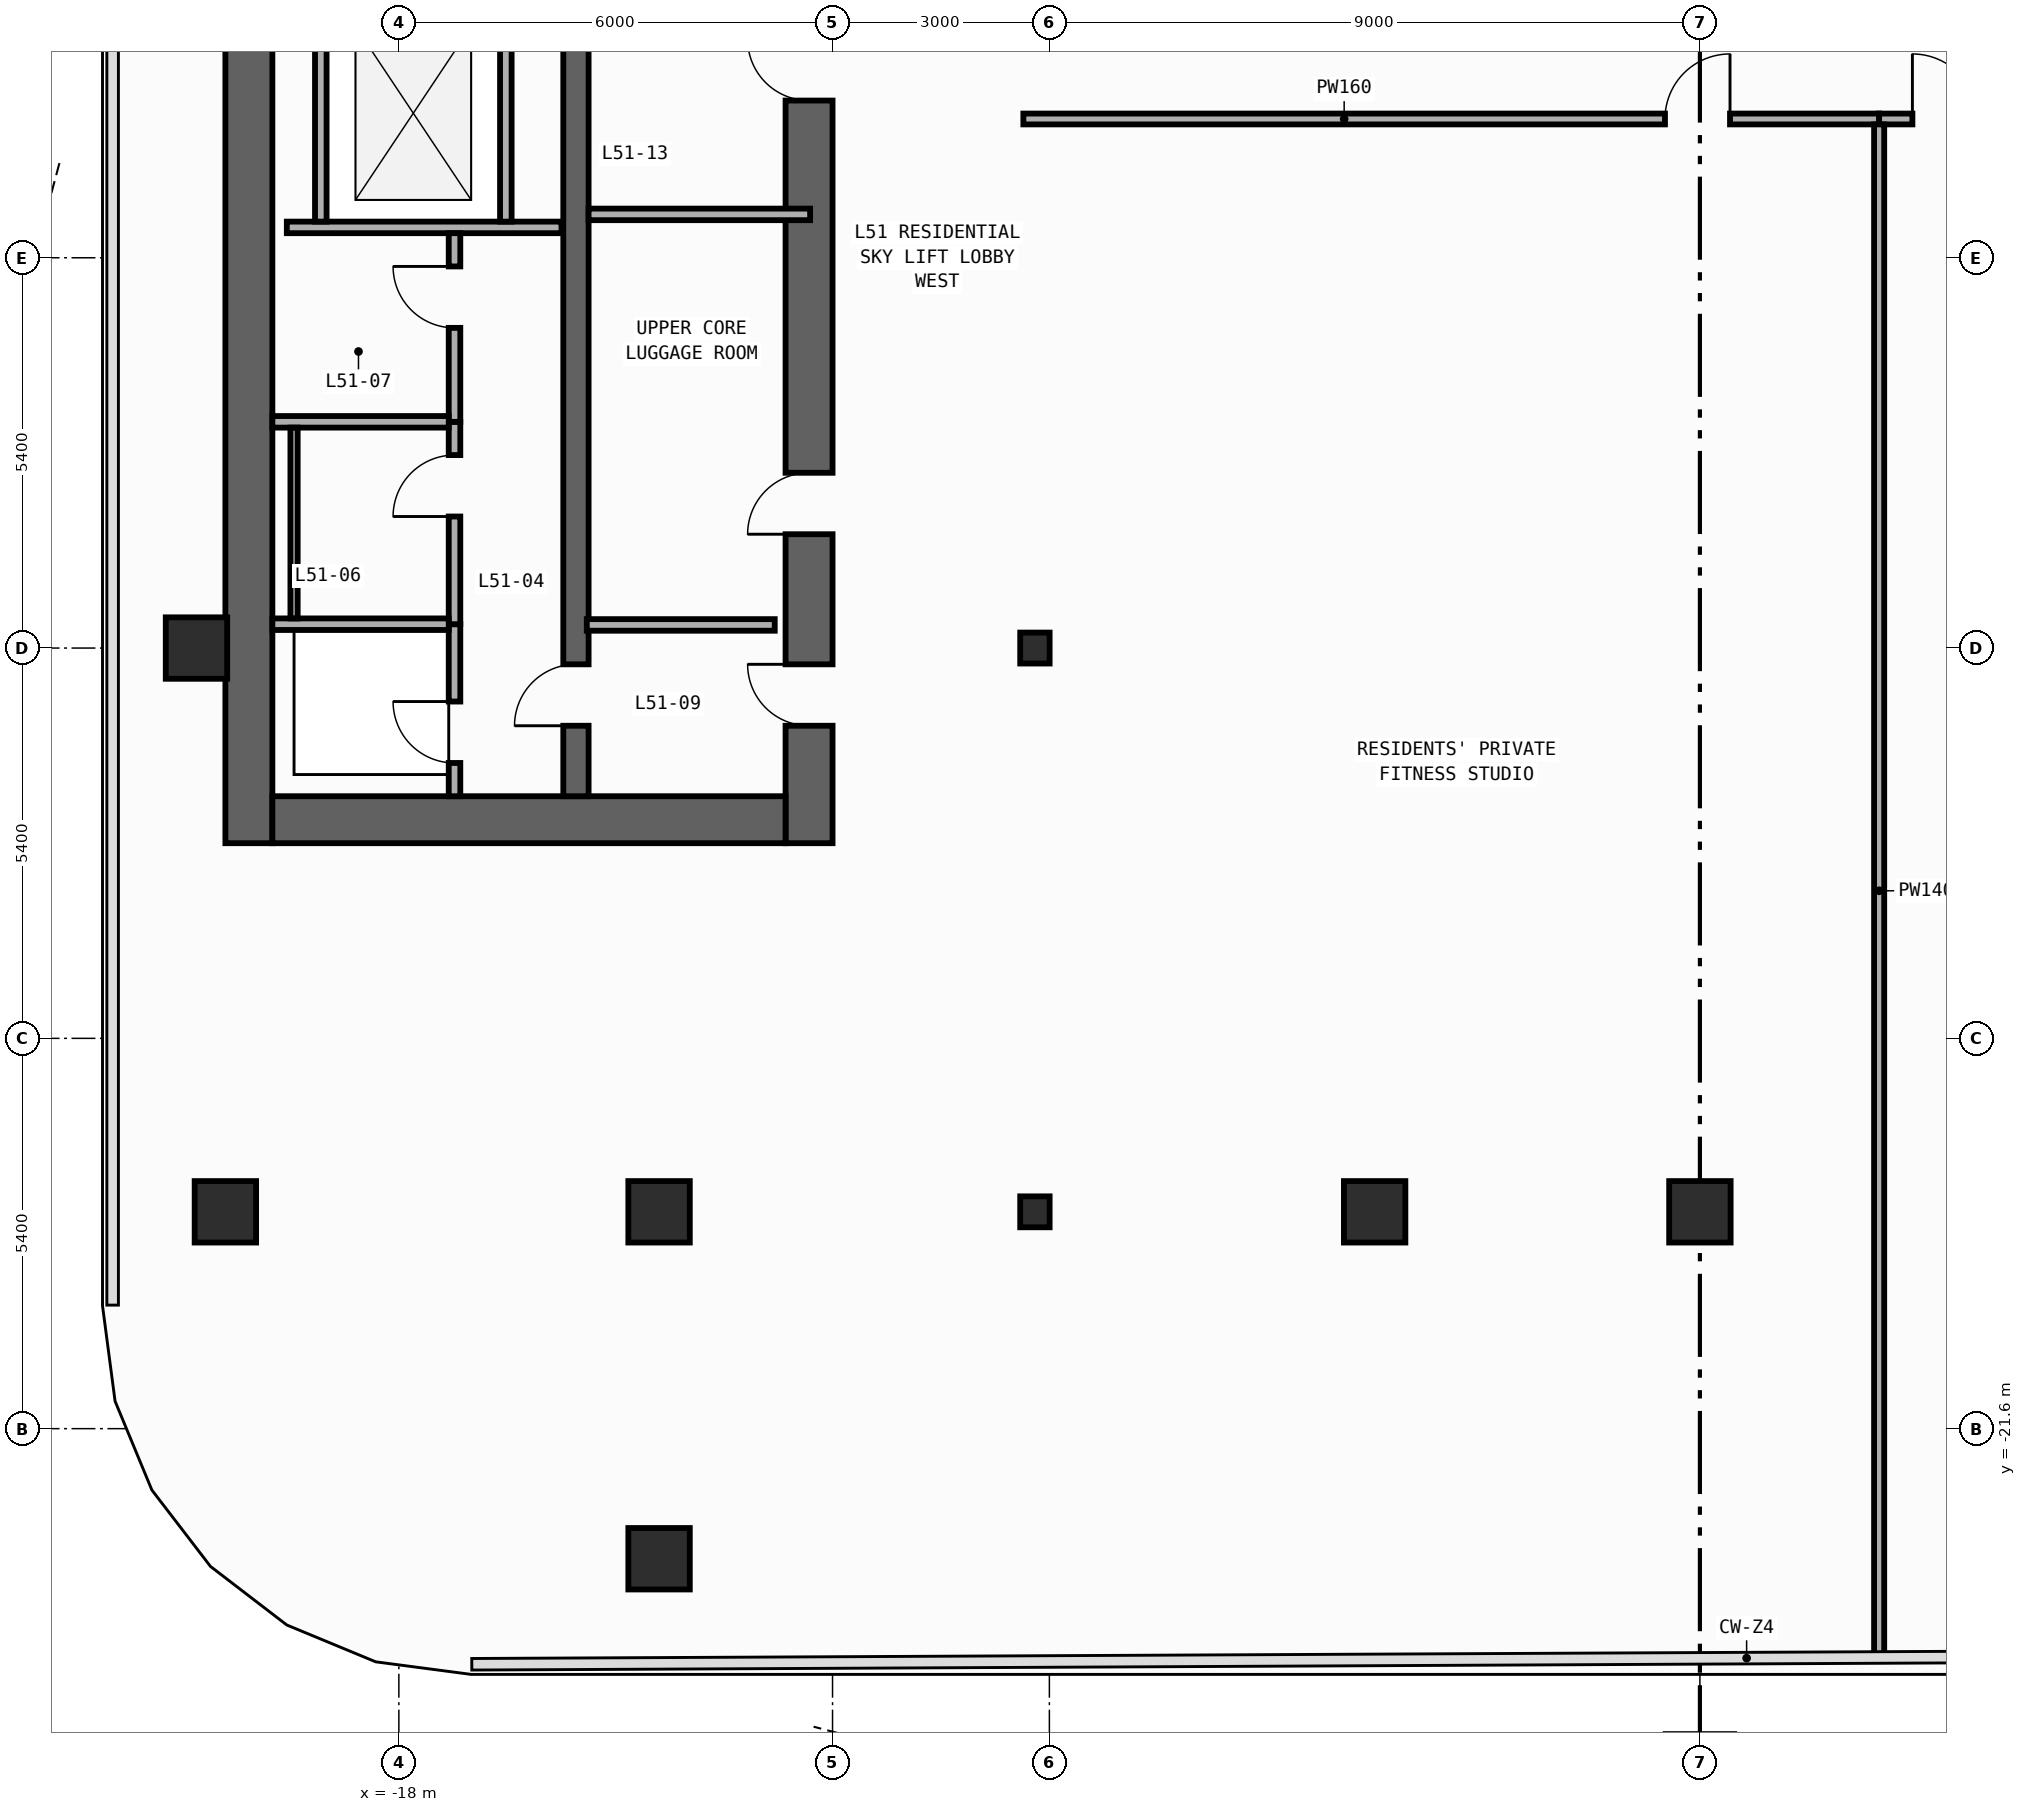
"""IFC4 building model, lengths in metres.
Left out: names, types, materials, properties, quantities, classifications, styles, units other than length and angle.
Written with IfcOpenShell. Run it as: python <this file> out.ifc"""

import sys

from ifc_helpers import new_model, si_unit, direction, frame, frame_2d, origin, origin_2d, place, context, subcontext, project, spatial, rectangle, i_section, extrude, element, fill, save


model = new_model("IFC4")
c1 = context("Model", 3, precision=1e-05, world=origin(), true_north=direction((0.0, 1.0)))
c2 = subcontext(c1, "Body", "Model", "MODEL_VIEW")
j1 = project(units=[si_unit("LENGTHUNIT", "METRE"), si_unit("PLANEANGLEUNIT", "RADIAN")], contexts=[c1])
p1 = place(None, origin())
s1 = spatial("IfcSite", under=j1, at=p1, CompositionType="ELEMENT")
p2 = place(p1, origin())
s2 = spatial("IfcBuilding", under=s1, at=p2, CompositionType="ELEMENT")
p3 = place(p2, frame((0.0, 0.0, 222.4)))
s3 = spatial("IfcBuildingStorey", under=s2, at=p3, CompositionType="ELEMENT", Elevation=222.4)
p4 = place(p3, frame((-20.075, -13.5, 0.0), z_axis=(0.0, 0.0, 1.0), x_axis=(0.0, 1.0, 0.0)))
e1 = element("IfcWall", 1, at=p4, inside=s3, PredefinedType="SHEAR", context=c2, shape_type="SweptSolid", body=[
    extrude(rectangle(XDim=27.0, YDim=0.65, at=frame_2d((13.5, 0.0))), origin(), (0.0, 0.0, 1.0), 3.34),
])
p5 = place(p3, frame((-12.325, -13.5, 0.0), z_axis=(0.0, 0.0, 1.0), x_axis=(0.0, 1.0, 0.0)))
e2 = element("IfcWall", 2, at=p5, inside=s3, PredefinedType="SHEAR", context=c2, shape_type="SweptSolid", body=[
    extrude(rectangle(XDim=27.0, YDim=0.65, at=frame_2d((13.5, 0.0))), origin(), (0.0, 0.0, 1.0), 3.34),
])
p6 = place(p5, frame((15.175, 0.0, 0.0)))
e3 = element("IfcOpeningElement", 3, at=p6, cuts=e2, PredefinedType="OPENING", context=c2, shape_type="SweptSolid", body=[
    extrude(rectangle(XDim=0.85, YDim=2.1, at=frame_2d((0.425, 1.05))), frame((0.0, 0.335, 0.0), z_axis=(0.0, -1.0, 0.0), x_axis=(1.0, 0.0, 0.0)), (0.0, 0.0, 1.0), 0.67),
])
p7 = place(p5, frame((21.275, 0.0, 0.0)))
e4 = element("IfcOpeningElement", 4, at=p7, cuts=e2, PredefinedType="OPENING", context=c2, shape_type="SweptSolid", body=[
    extrude(rectangle(XDim=0.85, YDim=2.1, at=frame_2d((0.425, 1.05))), frame((0.0, 0.335, 0.0), z_axis=(0.0, -1.0, 0.0), x_axis=(1.0, 0.0, 0.0)), (0.0, 0.0, 1.0), 0.67),
])
p8 = place(p5, frame((4.275, 0.0, 0.0)))
e5 = element("IfcOpeningElement", 5, at=p8, cuts=e2, PredefinedType="OPENING", context=c2, shape_type="SweptSolid", body=[
    extrude(rectangle(XDim=0.85, YDim=2.1, at=frame_2d((0.425, 1.05))), frame((0.0, 0.335, 0.0), z_axis=(0.0, -1.0, 0.0), x_axis=(1.0, 0.0, 0.0)), (0.0, 0.0, 1.0), 0.67),
])
p9 = place(p5, frame((10.275, 0.0, 0.0)))
e6 = element("IfcOpeningElement", 6, at=p9, cuts=e2, PredefinedType="OPENING", context=c2, shape_type="SweptSolid", body=[
    extrude(rectangle(XDim=0.85, YDim=2.1, at=frame_2d((0.425, 1.05))), frame((0.0, 0.335, 0.0), z_axis=(0.0, -1.0, 0.0), x_axis=(1.0, 0.0, 0.0)), (0.0, 0.0, 1.0), 0.67),
])
p10 = place(p5, frame((12.725, 0.0, 0.0)))
e7 = element("IfcOpeningElement", 7, at=p10, cuts=e2, PredefinedType="OPENING", context=c2, shape_type="SweptSolid", body=[
    extrude(rectangle(XDim=1.15, YDim=2.2, at=frame_2d((0.575, 1.1))), frame((0.0, 0.335, 0.0), z_axis=(0.0, -1.0, 0.0), x_axis=(1.0, 0.0, 0.0)), (0.0, 0.0, 1.0), 0.67),
])
p11 = place(p5, frame((1.625, 0.0, 0.0)))
e8 = element("IfcOpeningElement", 8, at=p11, cuts=e2, PredefinedType="OPENING", context=c2, shape_type="SweptSolid", body=[
    extrude(rectangle(XDim=0.85, YDim=2.1, at=frame_2d((0.425, 1.05))), frame((0.0, 0.335, 0.0), z_axis=(0.0, -1.0, 0.0), x_axis=(1.0, 0.0, 0.0)), (0.0, 0.0, 1.0), 0.67),
])
p12 = place(p3, frame((-19.75, -13.175, 0.0), z_axis=(0.0, 0.0, 1.0), x_axis=(1.0, 0.0, 0.0)))
e9 = element("IfcWall", 9, at=p12, inside=s3, PredefinedType="SHEAR", context=c2, shape_type="SweptSolid", body=[
    extrude(rectangle(XDim=7.1, YDim=0.65, at=frame_2d((3.55, 0.0))), origin(), (0.0, 0.0, 1.0), 3.34),
])
p13 = place(p3, frame((-15.55, -12.85, 0.0), z_axis=(0.0, 0.0, 1.0), x_axis=(0.0, 1.0, 0.0)))
e10 = element("IfcWall", 10, at=p13, inside=s3, PredefinedType="SHEAR", context=c2, shape_type="SweptSolid", body=[
    extrude(rectangle(XDim=25.7, YDim=0.35, at=frame_2d((12.85, 0.0))), origin(), (0.0, 0.0, 1.0), 3.34),
])
p14 = place(p13, frame((12.075, 0.0, 0.0)))
e11 = element("IfcOpeningElement", 11, at=p14, cuts=e10, PredefinedType="OPENING", context=c2, shape_type="SweptSolid", body=[
    extrude(rectangle(XDim=1.15, YDim=2.2, at=frame_2d((0.575, 1.1))), frame((0.0, 0.185, 0.0), z_axis=(0.0, -1.0, 0.0), x_axis=(1.0, 0.0, 0.0)), (0.0, 0.0, 1.0), 0.37),
])
p15 = place(p13, frame((0.975, 0.0, 0.0)))
e12 = element("IfcOpeningElement", 12, at=p15, cuts=e10, PredefinedType="OPENING", context=c2, shape_type="SweptSolid", body=[
    extrude(rectangle(XDim=0.85, YDim=2.1, at=frame_2d((0.425, 1.05))), frame((0.0, 0.185, 0.0), z_axis=(0.0, -1.0, 0.0), x_axis=(1.0, 0.0, 0.0)), (0.0, 0.0, 1.0), 0.37),
])
for number, where, z_axis, x_axis in (
    (13, (-9.2, -18.6, 0.0), (0.0, 0.0, 1.0), (1.0, 0.0, 0.0)),
    (14, (-9.2, -10.8, 0.0), (0.0, 0.0, 1.0), (1.0, 0.0, 0.0)),
):
    element("IfcColumn", number, at=place(p3, frame(where, z_axis=z_axis, x_axis=x_axis)), inside=s3, PredefinedType="COLUMN", context=c2, shape_type="SweptSolid", body=[
        extrude(i_section(OverallWidth=0.407, OverallDepth=0.428, WebThickness=0.02, FlangeThickness=0.035, FilletRadius=0.022, at=origin_2d()), origin(), (0.0, 0.0, 1.0), 3.6),
    ])
for number, where, z_axis, x_axis in (
    (15, (-20.4, -18.6, 0.0), (0.0, 0.0, 1.0), (1.0, 0.0, 0.0)),
    (16, (-14.4, -18.6, 0.0), (0.0, 0.0, 1.0), (1.0, 0.0, 0.0)),
    (17, (-4.5, -18.6, 0.0), (0.0, 0.0, 1.0), (1.0, 0.0, 0.0)),
    (18, (0.0, -18.6, 0.0), (0.0, 0.0, 1.0), (1.0, 0.0, 0.0)),
    (19, (-20.8, -10.8, 0.0), (0.0, 0.0, 1.0), (1.0, 0.0, 0.0)),
    (20, (-14.4, -23.4, 0.0), (0.0, 0.0, 1.0), (1.0, 0.0, 0.0)),
):
    element("IfcColumn", number, at=place(p3, frame(where, z_axis=z_axis, x_axis=x_axis)), inside=s3, PredefinedType="COLUMN", context=c2, shape_type="SweptSolid", body=[
        extrude(rectangle(XDim=0.85, YDim=0.85, at=origin_2d()), origin(), (0.0, 0.0, 1.0), 3.6),
    ])
p16 = place(p3, frame((-19.55, -4.98, 0.0), z_axis=(0.0, 0.0, 1.0), x_axis=(1.0, 0.0, 0.0)))
e21 = element("IfcWall", 21, at=p16, inside=s3, PredefinedType="STANDARD", context=c2, shape_type="SweptSolid", body=[
    extrude(rectangle(XDim=3.8, YDim=0.16, at=frame_2d((1.9, 0.0))), origin(), (0.0, 0.0, 1.0), 3.34),
])
for number, where, z_axis, x_axis in (
    (22, (-19.08, -4.9, 0.0), (0.0, 0.0, 1.0), (0.0, 1.0, 0.0)),
    (23, (-16.52, -4.9, 0.0), (0.0, 0.0, 1.0), (0.0, 1.0, 0.0)),
):
    element("IfcWall", number, at=place(p3, frame(where, z_axis=z_axis, x_axis=x_axis)), inside=s3, PredefinedType="STANDARD", context=c2, shape_type="SweptSolid", body=[
        extrude(rectangle(XDim=2.96, YDim=0.16, at=frame_2d((1.48, 0.0))), origin(), (0.0, 0.0, 1.0), 3.34),
    ])
p17 = place(p3, frame((-15.4, -10.48, 0.0), z_axis=(0.0, 0.0, 1.0), x_axis=(1.0, 0.0, 0.0)))
e24 = element("IfcWall", 24, at=p17, inside=s3, PredefinedType="STANDARD", context=c2, shape_type="SweptSolid", body=[
    extrude(rectangle(XDim=2.6, YDim=0.16, at=frame_2d((1.3, 0.0))), origin(), (0.0, 0.0, 1.0), 3.34),
])
p18 = place(p3, frame((-17.23, -12.85, 0.0), z_axis=(0.0, 0.0, 1.0), x_axis=(0.0, 1.0, 0.0)))
e25 = element("IfcWall", 25, at=p18, inside=s3, PredefinedType="PARTITIONING", context=c2, shape_type="SweptSolid", body=[
    extrude(rectangle(XDim=2.38, YDim=0.16, at=frame_2d((1.19, 0.0))), origin(), (0.0, 0.0, 1.0), 3.34),
])
p19 = place(p18, frame((0.46, 0.0, 0.0)))
e26 = element("IfcOpeningElement", 26, at=p19, cuts=e25, PredefinedType="OPENING", context=c2, shape_type="SweptSolid", body=[
    extrude(rectangle(XDim=0.85, YDim=2.1, at=frame_2d((0.425, 1.05))), frame((0.0, 0.09, 0.0), z_axis=(0.0, -1.0, 0.0), x_axis=(1.0, 0.0, 0.0)), (0.0, 0.0, 1.0), 0.18),
])
p20 = place(p3, frame((-17.23, -10.47, 0.0), z_axis=(0.0, 0.0, 1.0), x_axis=(0.0, 1.0, 0.0)))
e27 = element("IfcWall", 27, at=p20, inside=s3, PredefinedType="PARTITIONING", context=c2, shape_type="SweptSolid", body=[
    extrude(rectangle(XDim=2.8, YDim=0.16, at=frame_2d((1.4, 0.0))), origin(), (0.0, 0.0, 1.0), 3.34),
])
p21 = place(p20, frame((1.49, 0.0, 0.0)))
e28 = element("IfcOpeningElement", 28, at=p21, cuts=e27, PredefinedType="OPENING", context=c2, shape_type="SweptSolid", body=[
    extrude(rectangle(XDim=0.85, YDim=2.1, at=frame_2d((0.425, 1.05))), frame((0.0, 0.09, 0.0), z_axis=(0.0, -1.0, 0.0), x_axis=(1.0, 0.0, 0.0)), (0.0, 0.0, 1.0), 0.18),
])
p22 = place(p3, frame((-17.23, -7.67, 0.0), z_axis=(0.0, 0.0, 1.0), x_axis=(0.0, 1.0, 0.0)))
e29 = element("IfcWall", 29, at=p22, inside=s3, PredefinedType="PARTITIONING", context=c2, shape_type="SweptSolid", body=[
    extrude(rectangle(XDim=2.61, YDim=0.16, at=frame_2d((1.305, 0.0))), origin(), (0.0, 0.0, 1.0), 3.34),
])
p23 = place(p22, frame((1.3, 0.0, 0.0)))
e30 = element("IfcOpeningElement", 30, at=p23, cuts=e29, PredefinedType="OPENING", context=c2, shape_type="SweptSolid", body=[
    extrude(rectangle(XDim=0.85, YDim=2.1, at=frame_2d((0.425, 1.05))), frame((0.0, 0.09, 0.0), z_axis=(0.0, -1.0, 0.0), x_axis=(1.0, 0.0, 0.0)), (0.0, 0.0, 1.0), 0.18),
])
for number, where, z_axis, x_axis in (
    (31, (-19.75, -10.47, 0.0), (0.0, 0.0, 1.0), (1.0, 0.0, 0.0)),
    (32, (-19.75, -7.67, 0.0), (0.0, 0.0, 1.0), (1.0, 0.0, 0.0)),
):
    element("IfcWall", number, at=place(p3, frame(where, z_axis=z_axis, x_axis=x_axis)), inside=s3, PredefinedType="PARTITIONING", context=c2, shape_type="SweptSolid", body=[
        extrude(rectangle(XDim=2.44, YDim=0.16, at=frame_2d((1.22, 0.0))), origin(), (0.0, 0.0, 1.0), 3.34),
    ])
p24 = place(p3, frame((-15.375, -4.8, 0.0), z_axis=(0.0, 0.0, 1.0), x_axis=(1.0, 0.0, 0.0)))
e33 = element("IfcWall", 33, at=p24, inside=s3, PredefinedType="PARTITIONING", context=c2, shape_type="SweptSolid", body=[
    extrude(rectangle(XDim=3.065, YDim=0.16, at=frame_2d((1.532, 0.0))), origin(), (0.0, 0.0, 1.0), 3.34),
])
p25 = place(p3, frame((-9.36, -3.48, 0.0), z_axis=(0.0, 0.0, 1.0), x_axis=(1.0, 0.0, 0.0)))
e34 = element("IfcWall", 34, at=p25, inside=s3, PredefinedType="PARTITIONING", context=c2, shape_type="SweptSolid", body=[
    extrude(rectangle(XDim=11.84, YDim=0.15, at=frame_2d((5.92, 0.0))), origin(), (0.0, 0.0, 1.0), 3.34),
])
p26 = place(p25, frame((8.877, 0.0, 0.0)))
e35 = element("IfcOpeningElement", 35, at=p26, cuts=e34, PredefinedType="OPENING", context=c2, shape_type="SweptSolid", body=[
    extrude(rectangle(XDim=0.9, YDim=2.15, at=frame_2d((0.45, 1.075))), frame((0.0, 0.085, 0.0), z_axis=(0.0, -1.0, 0.0), x_axis=(1.0, 0.0, 0.0)), (0.0, 0.0, 1.0), 0.17),
])
p27 = place(p3, frame((2.48, -3.48, 0.0), z_axis=(0.0, 0.0, 1.0), x_axis=(1.0, 0.0, 0.0)))
e36 = element("IfcWall", 36, at=p27, inside=s3, PredefinedType="PARTITIONING", context=c2, shape_type="SweptSolid", body=[
    extrude(rectangle(XDim=6.88, YDim=0.15, at=frame_2d((3.44, 0.0))), origin(), (0.0, 0.0, 1.0), 3.34),
])
p28 = place(p27, frame((0.46, 0.0, 0.0)))
e37 = element("IfcOpeningElement", 37, at=p28, cuts=e36, PredefinedType="OPENING", context=c2, shape_type="SweptSolid", body=[
    extrude(rectangle(XDim=0.9, YDim=2.15, at=frame_2d((0.45, 1.075))), frame((0.0, 0.085, 0.0), z_axis=(0.0, -1.0, 0.0), x_axis=(1.0, 0.0, 0.0)), (0.0, 0.0, 1.0), 0.17),
])
p29 = place(p3, frame((2.48, -24.761, 0.0), z_axis=(0.0, 0.0, 1.0), x_axis=(0.0, 1.0, 0.0)))
e38 = element("IfcWall", 38, at=p29, inside=s3, PredefinedType="PARTITIONING", context=c2, shape_type="SweptSolid", body=[
    extrude(rectangle(XDim=21.206, YDim=0.14, at=frame_2d((10.603, 0.0))), origin(), (0.0, 0.0, 1.0), 3.34),
])
p30 = place(p3, frame((-19.45, -10.39, 0.0), z_axis=(0.0, 0.0, 1.0), x_axis=(0.0, 1.0, 0.0)))
e39 = element("IfcWall", 39, at=p30, inside=s3, PredefinedType="PARTITIONING", context=c2, shape_type="SweptSolid", body=[
    extrude(rectangle(XDim=2.64, YDim=0.1, at=frame_2d((1.32, 0.0))), origin(), (0.0, 0.0, 1.0), 3.34),
])
p31 = place(p8, origin())
e40 = element("IfcDoor", 40, at=p31, inside=s3, OperationType="SINGLE_SWING_LEFT", PredefinedType="DOOR", context=c2, shape_type="SweptSolid", body=[
    extrude(rectangle(XDim=0.85, YDim=2.1, at=frame_2d((0.425, 1.05))), frame((0.0, 0.025, 0.0), z_axis=(0.0, -1.0, 0.0), x_axis=(1.0, 0.0, 0.0)), (0.0, 0.0, 1.0), 0.05),
])
fill(e5, e40)
p32 = place(p9, origin())
e41 = element("IfcDoor", 41, at=p32, inside=s3, OperationType="SINGLE_SWING_RIGHT", PredefinedType="DOOR", context=c2, shape_type="SweptSolid", body=[
    extrude(rectangle(XDim=0.85, YDim=2.1, at=frame_2d((0.425, 1.05))), frame((0.0, 0.025, 0.0), z_axis=(0.0, -1.0, 0.0), x_axis=(1.0, 0.0, 0.0)), (0.0, 0.0, 1.0), 0.05),
])
fill(e6, e41)
p33 = place(p11, origin())
e42 = element("IfcDoor", 42, at=p33, inside=s3, OperationType="SINGLE_SWING_RIGHT", PredefinedType="DOOR", context=c2, shape_type="SweptSolid", body=[
    extrude(rectangle(XDim=0.85, YDim=2.1, at=frame_2d((0.425, 1.05))), frame((0.0, 0.025, 0.0), z_axis=(0.0, -1.0, 0.0), x_axis=(1.0, 0.0, 0.0)), (0.0, 0.0, 1.0), 0.05),
])
fill(e8, e42)
p34 = place(p15, origin())
e43 = element("IfcDoor", 43, at=p34, inside=s3, OperationType="SINGLE_SWING_LEFT", PredefinedType="DOOR", context=c2, shape_type="SweptSolid", body=[
    extrude(rectangle(XDim=0.85, YDim=2.1, at=frame_2d((0.425, 1.05))), frame((0.0, 0.025, 0.0), z_axis=(0.0, -1.0, 0.0), x_axis=(1.0, 0.0, 0.0)), (0.0, 0.0, 1.0), 0.05),
])
fill(e12, e43)
p35 = place(p19, origin())
e44 = element("IfcDoor", 44, at=p35, inside=s3, OperationType="SINGLE_SWING_RIGHT", PredefinedType="DOOR", context=c2, shape_type="SweptSolid", body=[
    extrude(rectangle(XDim=0.85, YDim=2.1, at=frame_2d((0.425, 1.05))), frame((0.0, 0.025, 0.0), z_axis=(0.0, -1.0, 0.0), x_axis=(1.0, 0.0, 0.0)), (0.0, 0.0, 1.0), 0.05),
])
fill(e26, e44)
p36 = place(p21, origin())
e45 = element("IfcDoor", 45, at=p36, inside=s3, OperationType="SINGLE_SWING_LEFT", PredefinedType="DOOR", context=c2, shape_type="SweptSolid", body=[
    extrude(rectangle(XDim=0.85, YDim=2.1, at=frame_2d((0.425, 1.05))), frame((0.0, 0.025, 0.0), z_axis=(0.0, -1.0, 0.0), x_axis=(1.0, 0.0, 0.0)), (0.0, 0.0, 1.0), 0.05),
])
fill(e28, e45)
p37 = place(p23, origin())
e46 = element("IfcDoor", 46, at=p37, inside=s3, OperationType="SINGLE_SWING_RIGHT", PredefinedType="DOOR", context=c2, shape_type="SweptSolid", body=[
    extrude(rectangle(XDim=0.85, YDim=2.1, at=frame_2d((0.425, 1.05))), frame((0.0, 0.025, 0.0), z_axis=(0.0, -1.0, 0.0), x_axis=(1.0, 0.0, 0.0)), (0.0, 0.0, 1.0), 0.05),
])
fill(e30, e46)
p38 = place(p26, origin())
e47 = element("IfcDoor", 47, at=p38, inside=s3, OperationType="SINGLE_SWING_RIGHT", PredefinedType="DOOR", context=c2, shape_type="SweptSolid", body=[
    extrude(rectangle(XDim=0.9, YDim=2.15, at=frame_2d((0.45, 1.075))), frame((0.0, 0.025, 0.0), z_axis=(0.0, -1.0, 0.0), x_axis=(1.0, 0.0, 0.0)), (0.0, 0.0, 1.0), 0.05),
])
fill(e35, e47)
p39 = place(p28, origin())
e48 = element("IfcDoor", 48, at=p39, inside=s3, OperationType="SINGLE_SWING_LEFT", PredefinedType="DOOR", context=c2, shape_type="SweptSolid", body=[
    extrude(rectangle(XDim=0.9, YDim=2.15, at=frame_2d((0.45, 1.075))), frame((0.0, 0.025, 0.0), z_axis=(0.0, -1.0, 0.0), x_axis=(1.0, 0.0, 0.0)), (0.0, 0.0, 1.0), 0.05),
])
fill(e37, e48)
save(model, sys.argv[1])
